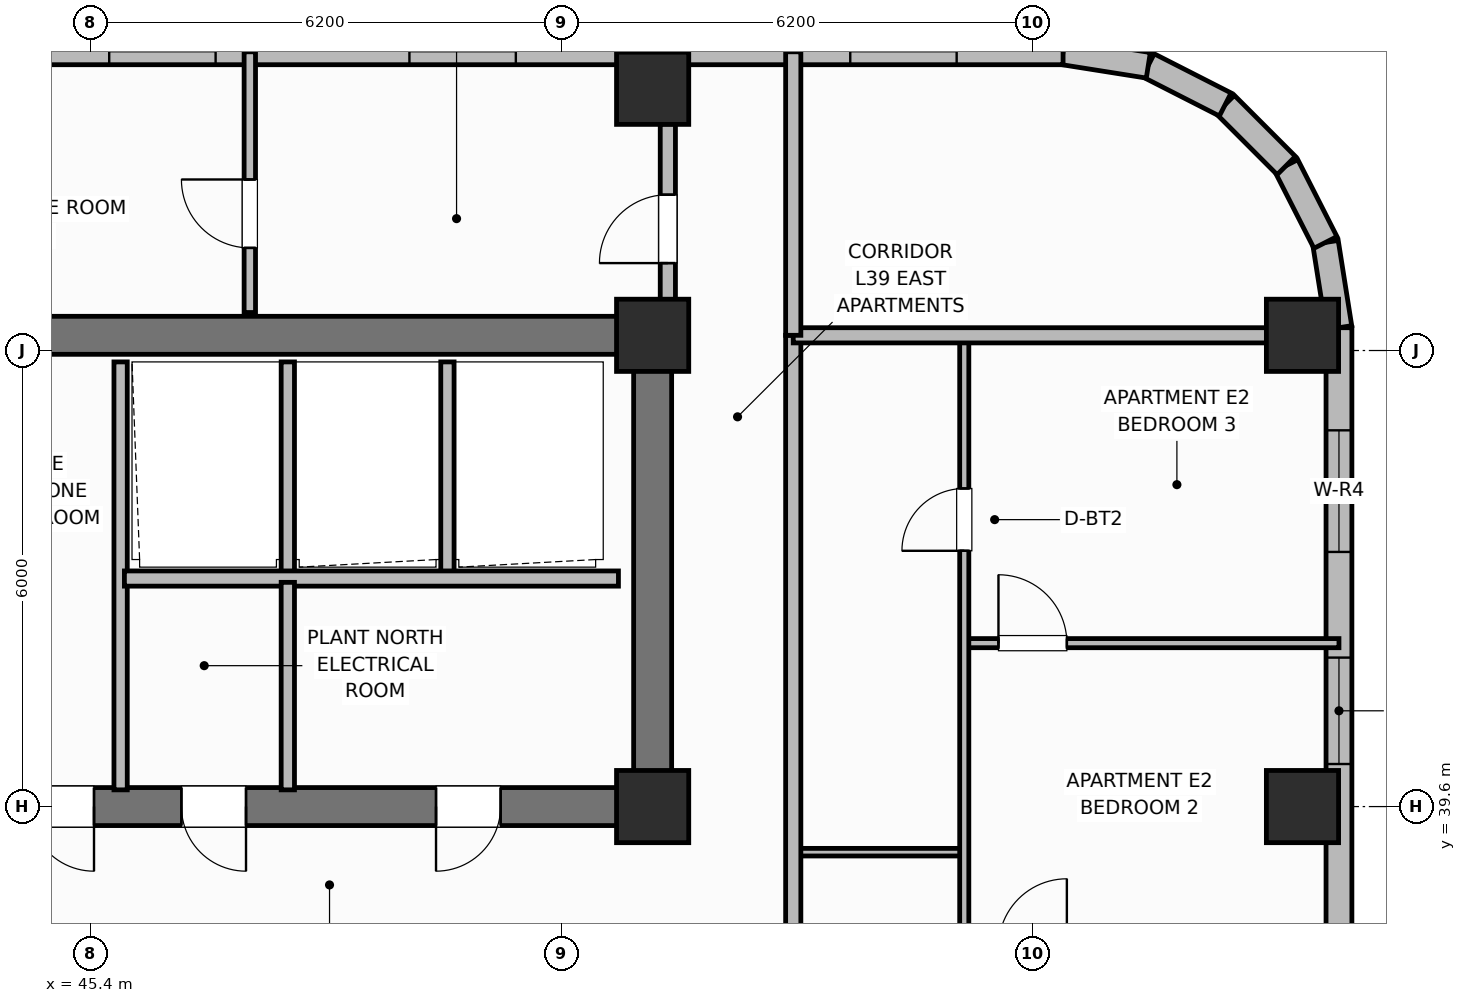
"""IFC4 building model, lengths in metres.
Left out: names, types, materials, properties, quantities, classifications, styles, units other than length and angle.
Written with IfcOpenShell. Run it as: python <this file> out.ifc"""

import sys

from ifc_helpers import new_model, si_unit, direction, frame, frame_2d, origin, origin_2d, place, context, subcontext, project, spatial, rectangle, extrude, element, fill, save


model = new_model("IFC4")
c1 = context("Model", 3, precision=1e-05, world=origin(), true_north=direction((0.0, 1.0)))
c2 = subcontext(c1, "Body", "Model", "MODEL_VIEW")
j1 = project(units=[si_unit("LENGTHUNIT", "METRE"), si_unit("PLANEANGLEUNIT", "RADIAN")], contexts=[c1])
p1 = place(None, origin())
s1 = spatial("IfcSite", under=j1, at=p1, CompositionType="ELEMENT")
p2 = place(p1, origin())
s2 = spatial("IfcBuilding", under=s1, at=p2, CompositionType="ELEMENT")
p3 = place(p2, frame((0.0, 0.0, 158.9)))
s3 = spatial("IfcBuildingStorey", under=s2, at=p3, CompositionType="ELEMENT", Elevation=158.9)
p4 = place(p3, frame((25.6, 45.8, 0.0), z_axis=(0.0, 0.0, 1.0), x_axis=(1.0, 0.0, 0.0)))
e1 = element("IfcWall", 1, at=p4, inside=s3, PredefinedType="SHEAR", context=c2, shape_type="SweptSolid", body=[
    extrude(rectangle(XDim=27.2, YDim=0.5, at=frame_2d((13.6, 0.0))), origin(), (0.0, 0.0, 1.0), 3.7),
])
p5 = place(p3, frame((52.8, 39.85, 0.0), z_axis=(0.0, 0.0, 1.0), x_axis=(0.0, 1.0, 0.0)))
e2 = element("IfcWall", 2, at=p5, inside=s3, PredefinedType="SHEAR", context=c2, shape_type="SweptSolid", body=[
    extrude(rectangle(XDim=5.7, YDim=0.5, at=frame_2d((2.85, 0.0))), origin(), (0.0, 0.0, 1.0), 3.7),
])
p6 = place(p3, frame((52.8, 39.6, 0.0), z_axis=(0.0, 0.0, 1.0), x_axis=(-1.0, 0.0, 0.0)))
e3 = element("IfcWall", 3, at=p6, inside=s3, PredefinedType="SHEAR", context=c2, shape_type="SweptSolid", body=[
    extrude(rectangle(XDim=27.2, YDim=0.5, at=frame_2d((13.6, 0.0))), origin(), (0.0, 0.0, 1.0), 3.7),
])
p7 = place(p6, frame((24.3, 0.0, 0.0)))
e4 = element("IfcOpeningElement", 4, at=p7, cuts=e3, PredefinedType="OPENING", context=c2, shape_type="SweptSolid", body=[
    extrude(rectangle(XDim=1.1, YDim=2.15, at=frame_2d((0.55, 1.075))), frame((0.0, 0.26, 0.0), z_axis=(0.0, -1.0, 0.0), x_axis=(1.0, 0.0, 0.0)), (0.0, 0.0, 1.0), 0.52),
])
p8 = place(p6, frame((21.85, 0.0, 0.0)))
e5 = element("IfcOpeningElement", 5, at=p8, cuts=e3, PredefinedType="OPENING", context=c2, shape_type="SweptSolid", body=[
    extrude(rectangle(XDim=0.85, YDim=2.1, at=frame_2d((0.425, 1.05))), frame((0.0, 0.26, 0.0), z_axis=(0.0, -1.0, 0.0), x_axis=(1.0, 0.0, 0.0)), (0.0, 0.0, 1.0), 0.52),
])
p9 = place(p6, frame((19.85, 0.0, 0.0)))
e6 = element("IfcOpeningElement", 6, at=p9, cuts=e3, PredefinedType="OPENING", context=c2, shape_type="SweptSolid", body=[
    extrude(rectangle(XDim=0.85, YDim=2.1, at=frame_2d((0.425, 1.05))), frame((0.0, 0.26, 0.0), z_axis=(0.0, -1.0, 0.0), x_axis=(1.0, 0.0, 0.0)), (0.0, 0.0, 1.0), 0.52),
])
p10 = place(p6, frame((15.1, 0.0, 0.0)))
e7 = element("IfcOpeningElement", 7, at=p10, cuts=e3, PredefinedType="OPENING", context=c2, shape_type="SweptSolid", body=[
    extrude(rectangle(XDim=1.2, YDim=2.15, at=frame_2d((0.6, 1.075))), frame((0.0, 0.26, 0.0), z_axis=(0.0, -1.0, 0.0), x_axis=(1.0, 0.0, 0.0)), (0.0, 0.0, 1.0), 0.52),
])
p11 = place(p6, frame((12.6, 0.0, 0.0)))
e8 = element("IfcOpeningElement", 8, at=p11, cuts=e3, PredefinedType="OPENING", context=c2, shape_type="SweptSolid", body=[
    extrude(rectangle(XDim=0.85, YDim=2.1, at=frame_2d((0.425, 1.05))), frame((0.0, 0.26, 0.0), z_axis=(0.0, -1.0, 0.0), x_axis=(1.0, 0.0, 0.0)), (0.0, 0.0, 1.0), 0.52),
])
p12 = place(p6, frame((10.85, 0.0, 0.0)))
e9 = element("IfcOpeningElement", 9, at=p12, cuts=e3, PredefinedType="OPENING", context=c2, shape_type="SweptSolid", body=[
    extrude(rectangle(XDim=0.85, YDim=2.1, at=frame_2d((0.425, 1.05))), frame((0.0, 0.26, 0.0), z_axis=(0.0, -1.0, 0.0), x_axis=(1.0, 0.0, 0.0)), (0.0, 0.0, 1.0), 0.52),
])
p13 = place(p6, frame((7.35, 0.0, 0.0)))
e10 = element("IfcOpeningElement", 10, at=p13, cuts=e3, PredefinedType="OPENING", context=c2, shape_type="SweptSolid", body=[
    extrude(rectangle(XDim=0.85, YDim=2.1, at=frame_2d((0.425, 1.05))), frame((0.0, 0.26, 0.0), z_axis=(0.0, -1.0, 0.0), x_axis=(1.0, 0.0, 0.0)), (0.0, 0.0, 1.0), 0.52),
])
p14 = place(p6, frame((5.35, 0.0, 0.0)))
e11 = element("IfcOpeningElement", 11, at=p14, cuts=e3, PredefinedType="OPENING", context=c2, shape_type="SweptSolid", body=[
    extrude(rectangle(XDim=0.85, YDim=2.1, at=frame_2d((0.425, 1.05))), frame((0.0, 0.26, 0.0), z_axis=(0.0, -1.0, 0.0), x_axis=(1.0, 0.0, 0.0)), (0.0, 0.0, 1.0), 0.52),
])
p15 = place(p6, frame((2.0, 0.0, 0.0)))
e12 = element("IfcOpeningElement", 12, at=p15, cuts=e3, PredefinedType="OPENING", context=c2, shape_type="SweptSolid", body=[
    extrude(rectangle(XDim=0.85, YDim=2.1, at=frame_2d((0.425, 1.05))), frame((0.0, 0.26, 0.0), z_axis=(0.0, -1.0, 0.0), x_axis=(1.0, 0.0, 0.0)), (0.0, 0.0, 1.0), 0.52),
])
for number, where, z_axis, x_axis in (
    (13, (52.8, 39.6, 0.0), (0.0, 0.0, 1.0), (1.0, 0.0, 0.0)),
    (14, (52.8, 45.8, 0.0), (0.0, 0.0, 1.0), (1.0, 0.0, 0.0)),
    (15, (52.8, 49.05, 0.0), (0.0, 0.0, 1.0), (1.0, 0.0, 0.0)),
    (16, (61.35, 39.6, 0.0), (0.0, 0.0, 1.0), (1.0, 0.0, 0.0)),
    (17, (61.35, 45.8, 0.0), (0.0, 0.0, 1.0), (1.0, 0.0, 0.0)),
):
    element("IfcColumn", number, at=place(p3, frame(where, z_axis=z_axis, x_axis=x_axis)), inside=s3, PredefinedType="COLUMN", context=c2, shape_type="SweptSolid", body=[
        extrude(rectangle(XDim=0.95, YDim=0.95, at=origin_2d()), origin(), (0.0, 0.0, 1.0), 3.7),
    ])
p16 = place(p3, frame((61.83, 32.6, 0.0), z_axis=(0.0, 0.0, 1.0), x_axis=(0.0, 1.0, 0.0)))
e18 = element("IfcWall", 18, at=p16, inside=s3, PredefinedType="SOLIDWALL", context=c2, shape_type="SweptSolid", body=[
    extrude(rectangle(XDim=13.3, YDim=0.34, at=frame_2d((6.65, 0.0))), origin(), (0.0, 0.0, 1.0), 2.72),
])
p17 = place(p16, frame((2.1, 0.0, 0.0)))
e19 = element("IfcOpeningElement", 19, at=p17, cuts=e18, PredefinedType="OPENING", context=c2, shape_type="SweptSolid", body=[
    extrude(rectangle(XDim=1.6, YDim=2.1, at=frame_2d((0.8, 1.05))), frame((0.0, 0.18, 0.0), z_axis=(0.0, -1.0, 0.0), x_axis=(1.0, 0.0, 0.0)), (0.0, 0.0, 1.0), 0.36),
])
p18 = place(p16, frame((7.56, 0.0, 0.71)))
e20 = element("IfcOpeningElement", 20, at=p18, cuts=e18, PredefinedType="OPENING", context=c2, shape_type="SweptSolid", body=[
    extrude(rectangle(XDim=1.4, YDim=1.85, at=frame_2d((0.7, 0.925))), frame((0.0, 0.18, 0.0), z_axis=(0.0, -1.0, 0.0), x_axis=(1.0, 0.0, 0.0)), (0.0, 0.0, 1.0), 0.36),
])
p19 = place(p16, frame((10.35, 0.0, 0.7)))
e21 = element("IfcOpeningElement", 21, at=p19, cuts=e18, PredefinedType="OPENING", context=c2, shape_type="SweptSolid", body=[
    extrude(rectangle(XDim=1.6, YDim=1.9, at=frame_2d((0.8, 0.95))), frame((0.0, 0.18, 0.0), z_axis=(0.0, -1.0, 0.0), x_axis=(1.0, 0.0, 0.0)), (0.0, 0.0, 1.0), 0.36),
])
for number, where, z_axis, x_axis in (
    (22, (61.83, 45.9, 0.0), (0.0, 0.0, 1.0), (-0.156, 0.988, 0.0)),
    (23, (61.652, 47.022, 0.0), (0.0, 0.0, 1.0), (-0.454, 0.891, 0.0)),
):
    element("IfcWall", number, at=place(p3, frame(where, z_axis=z_axis, x_axis=x_axis)), inside=s3, PredefinedType="SOLIDWALL", context=c2, shape_type="SweptSolid", body=[
        extrude(rectangle(XDim=1.136, YDim=0.34, at=frame_2d((0.568, 0.0))), origin(), (0.0, 0.0, 1.0), 2.72),
    ])
p20 = place(p3, frame((61.137, 48.034, 0.0), z_axis=(0.0, 0.0, 1.0), x_axis=(-0.707106781187, 0.707106781187, 0.0)))
e24 = element("IfcWall", 24, at=p20, inside=s3, PredefinedType="SOLIDWALL", context=c2, shape_type="SweptSolid", body=[
    extrude(rectangle(XDim=1.135, YDim=0.34, at=frame_2d((0.568, 0.0))), origin(), (0.0, 0.0, 1.0), 2.72),
])
for number, where, z_axis, x_axis in (
    (25, (60.334, 48.837, 0.0), (0.0, 0.0, 1.0), (-0.891, 0.454, 0.0)),
    (26, (59.322, 49.352, 0.0), (0.0, 0.0, 1.0), (-0.988, 0.156, 0.0)),
):
    element("IfcWall", number, at=place(p3, frame(where, z_axis=z_axis, x_axis=x_axis)), inside=s3, PredefinedType="SOLIDWALL", context=c2, shape_type="SweptSolid", body=[
        extrude(rectangle(XDim=1.136, YDim=0.34, at=frame_2d((0.568, 0.0))), origin(), (0.0, 0.0, 1.0), 2.72),
    ])
p21 = place(p3, frame((58.2, 49.53, 0.0), z_axis=(0.0, 0.0, 1.0), x_axis=(-1.0, 0.0, 0.0)))
e27 = element("IfcWall", 27, at=p21, inside=s3, PredefinedType="SOLIDWALL", context=c2, shape_type="SweptSolid", body=[
    extrude(rectangle(XDim=15.8, YDim=0.34, at=frame_2d((7.9, 0.0))), origin(), (0.0, 0.0, 1.0), 2.72),
])
p22 = place(p21, frame((1.4, 0.0, 0.75)))
e28 = element("IfcOpeningElement", 28, at=p22, cuts=e27, PredefinedType="OPENING", context=c2, shape_type="SweptSolid", body=[
    extrude(rectangle(XDim=1.4, YDim=1.85, at=frame_2d((0.7, 0.925))), frame((0.0, 0.18, 0.0), z_axis=(0.0, -1.0, 0.0), x_axis=(1.0, 0.0, 0.0)), (0.0, 0.0, 1.0), 0.36),
])
p23 = place(p21, frame((7.2, 0.0, 0.75)))
e29 = element("IfcOpeningElement", 29, at=p23, cuts=e27, PredefinedType="OPENING", context=c2, shape_type="SweptSolid", body=[
    extrude(rectangle(XDim=1.4, YDim=1.85, at=frame_2d((0.7, 0.925))), frame((0.0, 0.18, 0.0), z_axis=(0.0, -1.0, 0.0), x_axis=(1.0, 0.0, 0.0)), (0.0, 0.0, 1.0), 0.36),
])
p24 = place(p21, frame((11.15, 0.0, 0.75)))
e30 = element("IfcOpeningElement", 30, at=p24, cuts=e27, PredefinedType="OPENING", context=c2, shape_type="SweptSolid", body=[
    extrude(rectangle(XDim=1.4, YDim=1.85, at=frame_2d((0.7, 0.925))), frame((0.0, 0.18, 0.0), z_axis=(0.0, -1.0, 0.0), x_axis=(1.0, 0.0, 0.0)), (0.0, 0.0, 1.0), 0.36),
])
p25 = place(p3, frame((45.8, 39.82, 0.0), z_axis=(0.0, 0.0, 1.0), x_axis=(0.0, 1.0, 0.0)))
e31 = element("IfcWall", 31, at=p25, inside=s3, PredefinedType="PARTITIONING", context=c2, shape_type="SweptSolid", body=[
    extrude(rectangle(XDim=5.63, YDim=0.175, at=frame_2d((2.815, 0.0))), origin(), (0.0, 0.0, 1.0), 2.55),
])
for number, where, z_axis, x_axis in (
    (32, (48.0, 42.65, 0.0), (0.0, 0.0, 1.0), (0.0, 1.0, 0.0)),
    (33, (50.1, 42.65, 0.0), (0.0, 0.0, 1.0), (0.0, 1.0, 0.0)),
):
    element("IfcWall", number, at=place(p3, frame(where, z_axis=z_axis, x_axis=x_axis)), inside=s3, PredefinedType="PARTITIONING", context=c2, shape_type="SweptSolid", body=[
        extrude(rectangle(XDim=2.8, YDim=0.175, at=frame_2d((1.4, 0.0))), origin(), (0.0, 0.0, 1.0), 2.55),
    ])
p26 = place(p3, frame((52.35, 42.6, 0.0), z_axis=(0.0, 0.0, 1.0), x_axis=(-1.0, 0.0, 0.0)))
e34 = element("IfcWall", 34, at=p26, inside=s3, PredefinedType="PARTITIONING", context=c2, shape_type="SweptSolid", body=[
    extrude(rectangle(XDim=6.5, YDim=0.2, at=frame_2d((3.25, 0.0))), origin(), (0.0, 0.0, 1.0), 2.55),
])
p27 = place(p3, frame((48.0, 39.82, 0.0), z_axis=(0.0, 0.0, 1.0), x_axis=(0.0, 1.0, 0.0)))
e35 = element("IfcWall", 35, at=p27, inside=s3, PredefinedType="PARTITIONING", context=c2, shape_type="SweptSolid", body=[
    extrude(rectangle(XDim=2.73, YDim=0.175, at=frame_2d((1.365, 0.0))), origin(), (0.0, 0.0, 1.0), 2.55),
])
p28 = place(p3, frame((54.65, 39.0, 0.0), z_axis=(0.0, 0.0, 1.0), x_axis=(1.0, 0.0, 0.0)))
e36 = element("IfcWall", 36, at=p28, inside=s3, PredefinedType="PARTITIONING", context=c2, shape_type="SweptSolid", body=[
    extrude(rectangle(XDim=2.25, YDim=0.1, at=frame_2d((1.125, 0.0))), origin(), (0.0, 0.0, 1.0), 2.55),
])
p29 = place(p3, frame((56.9, 41.75, 0.0), z_axis=(0.0, 0.0, 1.0), x_axis=(1.0, 0.0, 0.0)))
e37 = element("IfcWall", 37, at=p29, inside=s3, PredefinedType="PARTITIONING", context=c2, shape_type="SweptSolid", body=[
    extrude(rectangle(XDim=4.93, YDim=0.12, at=frame_2d((2.465, 0.0))), origin(), (0.0, 0.0, 1.0), 2.55),
])
p30 = place(p29, frame((0.45, 0.0, 0.0)))
e38 = element("IfcOpeningElement", 38, at=p30, cuts=e37, PredefinedType="OPENING", context=c2, shape_type="SweptSolid", body=[
    extrude(rectangle(XDim=0.9, YDim=2.1, at=frame_2d((0.45, 1.05))), frame((0.0, 0.07, 0.0), z_axis=(0.0, -1.0, 0.0), x_axis=(1.0, 0.0, 0.0)), (0.0, 0.0, 1.0), 0.14),
])
p31 = place(p3, frame((56.9, 29.84, 0.0), z_axis=(0.0, 0.0, 1.0), x_axis=(0.0, 1.0, 0.0)))
e39 = element("IfcWall", 39, at=p31, inside=s3, PredefinedType="PARTITIONING", context=c2, shape_type="SweptSolid", body=[
    extrude(rectangle(XDim=15.92, YDim=0.12, at=frame_2d((7.96, 0.0))), origin(), (0.0, 0.0, 1.0), 2.55),
])
p32 = place(p31, frame((0.41, 0.0, 0.0)))
e40 = element("IfcOpeningElement", 40, at=p32, cuts=e39, PredefinedType="OPENING", context=c2, shape_type="SweptSolid", body=[
    extrude(rectangle(XDim=0.9, YDim=2.1, at=frame_2d((0.45, 1.05))), frame((0.0, 0.07, 0.0), z_axis=(0.0, -1.0, 0.0), x_axis=(1.0, 0.0, 0.0)), (0.0, 0.0, 1.0), 0.14),
])
p33 = place(p31, frame((13.125, 0.0, 0.0)))
e41 = element("IfcOpeningElement", 41, at=p33, cuts=e39, PredefinedType="OPENING", context=c2, shape_type="SweptSolid", body=[
    extrude(rectangle(XDim=0.82, YDim=2.08, at=frame_2d((0.41, 1.04))), frame((0.0, 0.07, 0.0), z_axis=(0.0, -1.0, 0.0), x_axis=(1.0, 0.0, 0.0)), (0.0, 0.0, 1.0), 0.14),
])
p34 = place(p3, frame((54.65, 10.6, 0.0), z_axis=(0.0, 0.0, 1.0), x_axis=(0.0, 1.0, 0.0)))
e42 = element("IfcWall", 42, at=p34, inside=s3, PredefinedType="PARTITIONING", context=c2, shape_type="SweptSolid", body=[
    extrude(rectangle(XDim=35.2, YDim=0.2, at=frame_2d((17.6, 0.0))), origin(), (0.0, 0.0, 1.0), 2.55),
])
p35 = place(p34, frame((2.65, 0.0, 0.0)))
e43 = element("IfcOpeningElement", 43, at=p35, cuts=e42, PredefinedType="OPENING", context=c2, shape_type="SweptSolid", body=[
    extrude(rectangle(XDim=1.0, YDim=2.15, at=frame_2d((0.5, 1.075))), frame((0.0, 0.11, 0.0), z_axis=(0.0, -1.0, 0.0), x_axis=(1.0, 0.0, 0.0)), (0.0, 0.0, 1.0), 0.22),
])
p36 = place(p34, frame((22.75, 0.0, 0.0)))
e44 = element("IfcOpeningElement", 44, at=p36, cuts=e42, PredefinedType="OPENING", context=c2, shape_type="SweptSolid", body=[
    extrude(rectangle(XDim=1.0, YDim=2.15, at=frame_2d((0.5, 1.075))), frame((0.0, 0.11, 0.0), z_axis=(0.0, -1.0, 0.0), x_axis=(1.0, 0.0, 0.0)), (0.0, 0.0, 1.0), 0.22),
])
p37 = place(p3, frame((54.65, 45.8, 0.0), z_axis=(0.0, 0.0, 1.0), x_axis=(1.0, 0.0, 0.0)))
e45 = element("IfcWall", 45, at=p37, inside=s3, PredefinedType="PARTITIONING", context=c2, shape_type="SweptSolid", body=[
    extrude(rectangle(XDim=6.76, YDim=0.2, at=frame_2d((3.38, 0.0))), origin(), (0.0, 0.0, 1.0), 2.55),
])
p38 = place(p3, frame((54.65, 45.8, 0.0), z_axis=(0.0, 0.0, 1.0), x_axis=(0.0, 1.0, 0.0)))
e46 = element("IfcWall", 46, at=p38, inside=s3, PredefinedType="PARTITIONING", context=c2, shape_type="SweptSolid", body=[
    extrude(rectangle(XDim=3.73, YDim=0.2, at=frame_2d((1.865, 0.0))), origin(), (0.0, 0.0, 1.0), 2.55),
])
p39 = place(p3, frame((47.5, 46.1, 0.0), z_axis=(0.0, 0.0, 1.0), x_axis=(0.0, 1.0, 0.0)))
e47 = element("IfcWall", 47, at=p39, inside=s3, PredefinedType="PARTITIONING", context=c2, shape_type="SweptSolid", body=[
    extrude(rectangle(XDim=3.43, YDim=0.15, at=frame_2d((1.715, 0.0))), origin(), (0.0, 0.0, 1.0), 2.55),
])
p40 = place(p39, frame((0.85, 0.0, 0.0)))
e48 = element("IfcOpeningElement", 48, at=p40, cuts=e47, PredefinedType="OPENING", context=c2, shape_type="SweptSolid", body=[
    extrude(rectangle(XDim=0.9, YDim=2.1, at=frame_2d((0.45, 1.05))), frame((0.0, 0.085, 0.0), z_axis=(0.0, -1.0, 0.0), x_axis=(1.0, 0.0, 0.0)), (0.0, 0.0, 1.0), 0.17),
])
p41 = place(p3, frame((53.0, 46.1, 0.0), z_axis=(0.0, 0.0, 1.0), x_axis=(0.0, 1.0, 0.0)))
e49 = element("IfcWall", 49, at=p41, inside=s3, PredefinedType="PARTITIONING", context=c2, shape_type="SweptSolid", body=[
    extrude(rectangle(XDim=2.48, YDim=0.2, at=frame_2d((1.24, 0.0))), origin(), (0.0, 0.0, 1.0), 2.55),
])
p42 = place(p41, frame((0.65, 0.0, 0.0)))
e50 = element("IfcOpeningElement", 50, at=p42, cuts=e49, PredefinedType="OPENING", context=c2, shape_type="SweptSolid", body=[
    extrude(rectangle(XDim=0.9, YDim=2.1, at=frame_2d((0.45, 1.05))), frame((0.0, 0.11, 0.0), z_axis=(0.0, -1.0, 0.0), x_axis=(1.0, 0.0, 0.0)), (0.0, 0.0, 1.0), 0.22),
])
p43 = place(p18, origin())
e51 = element("IfcWindow", 51, at=p43, inside=s3, PartitioningType="SINGLE_PANEL", PredefinedType="WINDOW", context=c2, shape_type="SweptSolid", body=[
    extrude(rectangle(XDim=1.4, YDim=1.85, at=frame_2d((0.7, 0.925))), frame((0.0, 0.03, 0.0), z_axis=(0.0, -1.0, 0.0), x_axis=(1.0, 0.0, 0.0)), (0.0, 0.0, 1.0), 0.06),
])
fill(e20, e51)
p44 = place(p19, origin())
e52 = element("IfcWindow", 52, at=p44, inside=s3, PartitioningType="SINGLE_PANEL", PredefinedType="WINDOW", context=c2, shape_type="SweptSolid", body=[
    extrude(rectangle(XDim=1.6, YDim=1.9, at=frame_2d((0.8, 0.95))), frame((0.0, 0.03, 0.0), z_axis=(0.0, -1.0, 0.0), x_axis=(1.0, 0.0, 0.0)), (0.0, 0.0, 1.0), 0.06),
])
fill(e21, e52)
p45 = place(p22, origin())
e53 = element("IfcWindow", 53, at=p45, inside=s3, PartitioningType="SINGLE_PANEL", PredefinedType="WINDOW", context=c2, shape_type="SweptSolid", body=[
    extrude(rectangle(XDim=1.4, YDim=1.85, at=frame_2d((0.7, 0.925))), frame((0.0, 0.03, 0.0), z_axis=(0.0, -1.0, 0.0), x_axis=(1.0, 0.0, 0.0)), (0.0, 0.0, 1.0), 0.06),
])
fill(e28, e53)
p46 = place(p23, origin())
e54 = element("IfcWindow", 54, at=p46, inside=s3, PartitioningType="SINGLE_PANEL", PredefinedType="WINDOW", context=c2, shape_type="SweptSolid", body=[
    extrude(rectangle(XDim=1.4, YDim=1.85, at=frame_2d((0.7, 0.925))), frame((0.0, 0.03, 0.0), z_axis=(0.0, -1.0, 0.0), x_axis=(1.0, 0.0, 0.0)), (0.0, 0.0, 1.0), 0.06),
])
fill(e29, e54)
p47 = place(p24, origin())
e55 = element("IfcWindow", 55, at=p47, inside=s3, PartitioningType="SINGLE_PANEL", PredefinedType="WINDOW", context=c2, shape_type="SweptSolid", body=[
    extrude(rectangle(XDim=1.4, YDim=1.85, at=frame_2d((0.7, 0.925))), frame((0.0, 0.03, 0.0), z_axis=(0.0, -1.0, 0.0), x_axis=(1.0, 0.0, 0.0)), (0.0, 0.0, 1.0), 0.06),
])
fill(e30, e55)
p48 = place(p30, origin())
e56 = element("IfcDoor", 56, at=p48, inside=s3, OperationType="SINGLE_SWING_LEFT", PredefinedType="DOOR", context=c2, shape_type="SweptSolid", body=[
    extrude(rectangle(XDim=0.9, YDim=2.1, at=frame_2d((0.45, 1.05))), frame((0.0, 0.025, 0.0), z_axis=(0.0, -1.0, 0.0), x_axis=(1.0, 0.0, 0.0)), (0.0, 0.0, 1.0), 0.05),
])
fill(e38, e56)
p49 = place(p33, origin())
e57 = element("IfcDoor", 57, at=p49, inside=s3, OperationType="SINGLE_SWING_LEFT", PredefinedType="DOOR", context=c2, shape_type="SweptSolid", body=[
    extrude(rectangle(XDim=0.82, YDim=2.08, at=frame_2d((0.41, 1.04))), frame((0.0, 0.025, 0.0), z_axis=(0.0, -1.0, 0.0), x_axis=(1.0, 0.0, 0.0)), (0.0, 0.0, 1.0), 0.05),
])
fill(e41, e57)
p50 = place(p40, origin())
e58 = element("IfcDoor", 58, at=p50, inside=s3, OperationType="SINGLE_SWING_RIGHT", PredefinedType="DOOR", context=c2, shape_type="SweptSolid", body=[
    extrude(rectangle(XDim=0.9, YDim=2.1, at=frame_2d((0.45, 1.05))), frame((0.0, 0.025, 0.0), z_axis=(0.0, -1.0, 0.0), x_axis=(1.0, 0.0, 0.0)), (0.0, 0.0, 1.0), 0.05),
])
fill(e48, e58)
p51 = place(p42, origin())
e59 = element("IfcDoor", 59, at=p51, inside=s3, OperationType="SINGLE_SWING_LEFT", PredefinedType="DOOR", context=c2, shape_type="SweptSolid", body=[
    extrude(rectangle(XDim=0.9, YDim=2.1, at=frame_2d((0.45, 1.05))), frame((0.0, 0.025, 0.0), z_axis=(0.0, -1.0, 0.0), x_axis=(1.0, 0.0, 0.0)), (0.0, 0.0, 1.0), 0.05),
])
fill(e50, e59)
p52 = place(p13, origin())
e60 = element("IfcDoor", 60, at=p52, inside=s3, OperationType="SINGLE_SWING_LEFT", PredefinedType="DOOR", context=c2, shape_type="SweptSolid", body=[
    extrude(rectangle(XDim=0.85, YDim=2.1, at=frame_2d((0.425, 1.05))), frame((0.0, 0.025, 0.0), z_axis=(0.0, -1.0, 0.0), x_axis=(1.0, 0.0, 0.0)), (0.0, 0.0, 1.0), 0.05),
])
fill(e10, e60)
p53 = place(p14, origin())
e61 = element("IfcDoor", 61, at=p53, inside=s3, OperationType="SINGLE_SWING_LEFT", PredefinedType="DOOR", context=c2, shape_type="SweptSolid", body=[
    extrude(rectangle(XDim=0.85, YDim=2.1, at=frame_2d((0.425, 1.05))), frame((0.0, 0.025, 0.0), z_axis=(0.0, -1.0, 0.0), x_axis=(1.0, 0.0, 0.0)), (0.0, 0.0, 1.0), 0.05),
])
fill(e11, e61)
p54 = place(p15, origin())
e62 = element("IfcDoor", 62, at=p54, inside=s3, OperationType="SINGLE_SWING_RIGHT", PredefinedType="DOOR", context=c2, shape_type="SweptSolid", body=[
    extrude(rectangle(XDim=0.85, YDim=2.1, at=frame_2d((0.425, 1.05))), frame((0.0, 0.025, 0.0), z_axis=(0.0, -1.0, 0.0), x_axis=(1.0, 0.0, 0.0)), (0.0, 0.0, 1.0), 0.05),
])
fill(e12, e62)
save(model, sys.argv[1])
